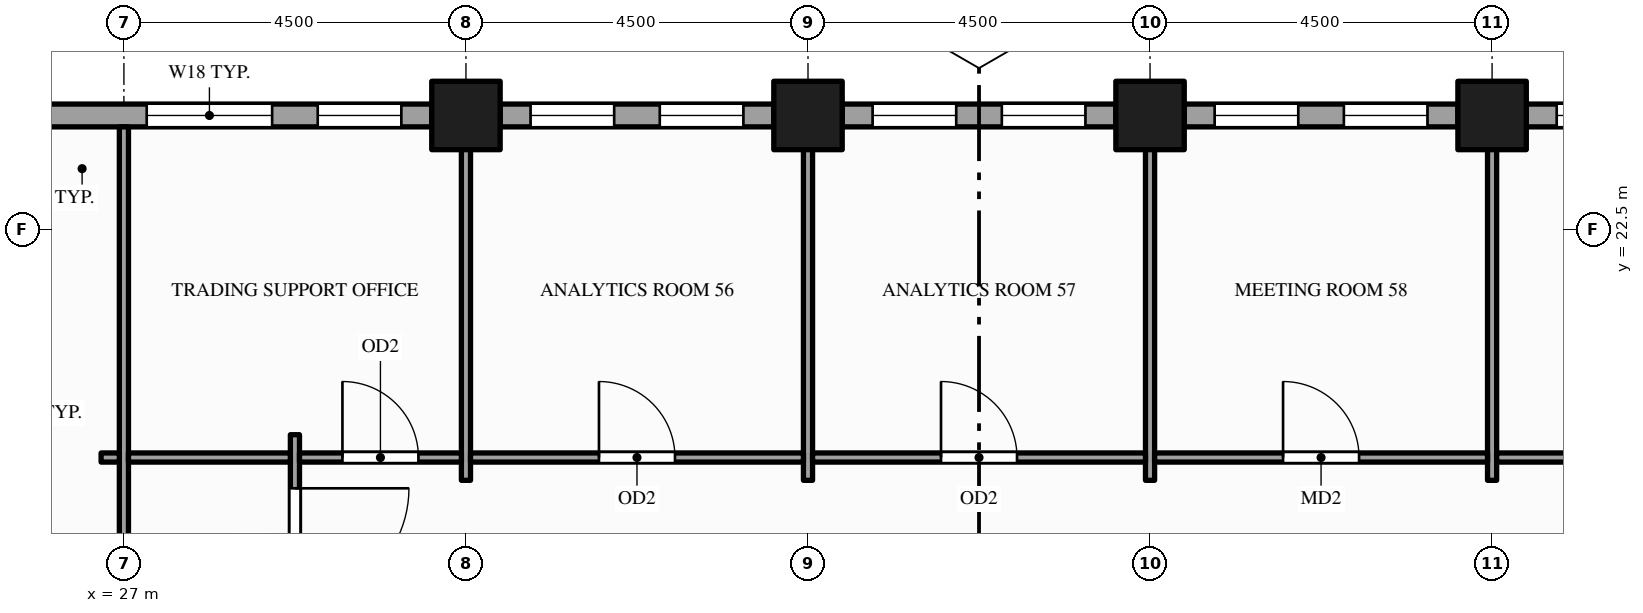
"""IFC4 building model, lengths in metres.
Left out: names, types, materials, properties, quantities, classifications, styles, units other than length and angle.
Written with IfcOpenShell. Run it as: python <this file> out.ifc"""

import sys

from ifc_helpers import new_model, si_unit, direction, frame, frame_2d, origin, origin_2d, place, context, subcontext, project, spatial, rectangle, hollow_rectangle, extrude, element, fill, save


model = new_model("IFC4")
c1 = context("Model", 3, precision=1e-05, world=origin(), true_north=direction((0.0, 1.0)))
c2 = subcontext(c1, "Body", "Model", "MODEL_VIEW")
j1 = project(units=[si_unit("LENGTHUNIT", "METRE"), si_unit("PLANEANGLEUNIT", "RADIAN")], contexts=[c1])
p1 = place(None, origin())
s1 = spatial("IfcSite", under=j1, at=p1, CompositionType="ELEMENT")
p2 = place(p1, origin())
s2 = spatial("IfcBuilding", under=s1, at=p2, CompositionType="ELEMENT")
p3 = place(p2, frame((0.0, 0.0, 179.0)))
s3 = spatial("IfcBuildingStorey", under=s2, at=p3, CompositionType="ELEMENT", Elevation=179.0)
for number, where, z_axis, x_axis in (
    (1, (31.5, 24.0, -0.15), (0.0, 0.0, 1.0), (1.0, 0.0, 0.0)),
    (2, (36.0, 24.0, -0.15), (0.0, 0.0, 1.0), (1.0, 0.0, 0.0)),
    (3, (40.5, 24.0, -0.15), (0.0, 0.0, 1.0), (1.0, 0.0, 0.0)),
    (4, (45.0, 24.0, -0.15), (0.0, 0.0, 1.0), (1.0, 0.0, 0.0)),
):
    element("IfcColumn", number, at=place(p3, frame(where, z_axis=z_axis, x_axis=x_axis)), inside=s3, PredefinedType="COLUMN", context=c2, shape_type="SweptSolid", body=[
        extrude(hollow_rectangle(XDim=0.9, YDim=0.9, WallThickness=0.045, at=origin_2d()), origin(), (0.0, 0.0, 1.0), 4.0),
    ])
p4 = place(p3, frame((49.05, 24.0, 0.0), z_axis=(0.0, 0.0, 1.0), x_axis=(-1.0, 0.0, 0.0)))
e5 = element("IfcWall", 5, at=p4, inside=s3, PredefinedType="STANDARD", context=c2, shape_type="SweptSolid", body=[
    extrude(rectangle(XDim=3.6, YDim=0.3, at=frame_2d((1.8, 0.0))), origin(), (0.0, 0.0, 1.0), 2.87),
])
p5 = place(p4, frame((0.4, 0.0, 0.9)))
e6 = element("IfcOpeningElement", 6, at=p5, cuts=e5, PredefinedType="OPENING", context=c2, shape_type="SweptSolid", body=[
    extrude(rectangle(XDim=1.1, YDim=1.75, at=frame_2d((0.55, 0.875))), frame((0.0, 0.16, 0.0), z_axis=(0.0, -1.0, 0.0), x_axis=(1.0, 0.0, 0.0)), (0.0, 0.0, 1.0), 0.32),
])
p6 = place(p4, frame((2.1, 0.0, 0.9)))
e7 = element("IfcOpeningElement", 7, at=p6, cuts=e5, PredefinedType="OPENING", context=c2, shape_type="SweptSolid", body=[
    extrude(rectangle(XDim=1.1, YDim=1.75, at=frame_2d((0.55, 0.875))), frame((0.0, 0.16, 0.0), z_axis=(0.0, -1.0, 0.0), x_axis=(1.0, 0.0, 0.0)), (0.0, 0.0, 1.0), 0.32),
])
p7 = place(p3, frame((44.55, 24.0, 0.0), z_axis=(0.0, 0.0, 1.0), x_axis=(-1.0, 0.0, 0.0)))
e8 = element("IfcWall", 8, at=p7, inside=s3, PredefinedType="STANDARD", context=c2, shape_type="SweptSolid", body=[
    extrude(rectangle(XDim=3.6, YDim=0.3, at=frame_2d((1.8, 0.0))), origin(), (0.0, 0.0, 1.0), 2.87),
])
p8 = place(p7, frame((0.4, 0.0, 0.9)))
e9 = element("IfcOpeningElement", 9, at=p8, cuts=e8, PredefinedType="OPENING", context=c2, shape_type="SweptSolid", body=[
    extrude(rectangle(XDim=1.1, YDim=1.75, at=frame_2d((0.55, 0.875))), frame((0.0, 0.16, 0.0), z_axis=(0.0, -1.0, 0.0), x_axis=(1.0, 0.0, 0.0)), (0.0, 0.0, 1.0), 0.32),
])
p9 = place(p7, frame((2.1, 0.0, 0.9)))
e10 = element("IfcOpeningElement", 10, at=p9, cuts=e8, PredefinedType="OPENING", context=c2, shape_type="SweptSolid", body=[
    extrude(rectangle(XDim=1.1, YDim=1.75, at=frame_2d((0.55, 0.875))), frame((0.0, 0.16, 0.0), z_axis=(0.0, -1.0, 0.0), x_axis=(1.0, 0.0, 0.0)), (0.0, 0.0, 1.0), 0.32),
])
p10 = place(p3, frame((40.05, 24.0, 0.0), z_axis=(0.0, 0.0, 1.0), x_axis=(-1.0, 0.0, 0.0)))
e11 = element("IfcWall", 11, at=p10, inside=s3, PredefinedType="STANDARD", context=c2, shape_type="SweptSolid", body=[
    extrude(rectangle(XDim=3.6, YDim=0.3, at=frame_2d((1.8, 0.0))), origin(), (0.0, 0.0, 1.0), 2.87),
])
p11 = place(p10, frame((0.4, 0.0, 0.9)))
e12 = element("IfcOpeningElement", 12, at=p11, cuts=e11, PredefinedType="OPENING", context=c2, shape_type="SweptSolid", body=[
    extrude(rectangle(XDim=1.1, YDim=1.75, at=frame_2d((0.55, 0.875))), frame((0.0, 0.16, 0.0), z_axis=(0.0, -1.0, 0.0), x_axis=(1.0, 0.0, 0.0)), (0.0, 0.0, 1.0), 0.32),
])
p12 = place(p10, frame((2.1, 0.0, 0.9)))
e13 = element("IfcOpeningElement", 13, at=p12, cuts=e11, PredefinedType="OPENING", context=c2, shape_type="SweptSolid", body=[
    extrude(rectangle(XDim=1.1, YDim=1.75, at=frame_2d((0.55, 0.875))), frame((0.0, 0.16, 0.0), z_axis=(0.0, -1.0, 0.0), x_axis=(1.0, 0.0, 0.0)), (0.0, 0.0, 1.0), 0.32),
])
p13 = place(p3, frame((35.55, 24.0, 0.0), z_axis=(0.0, 0.0, 1.0), x_axis=(-1.0, 0.0, 0.0)))
e14 = element("IfcWall", 14, at=p13, inside=s3, PredefinedType="STANDARD", context=c2, shape_type="SweptSolid", body=[
    extrude(rectangle(XDim=3.6, YDim=0.3, at=frame_2d((1.8, 0.0))), origin(), (0.0, 0.0, 1.0), 2.87),
])
p14 = place(p13, frame((0.4, 0.0, 0.9)))
e15 = element("IfcOpeningElement", 15, at=p14, cuts=e14, PredefinedType="OPENING", context=c2, shape_type="SweptSolid", body=[
    extrude(rectangle(XDim=1.1, YDim=1.75, at=frame_2d((0.55, 0.875))), frame((0.0, 0.16, 0.0), z_axis=(0.0, -1.0, 0.0), x_axis=(1.0, 0.0, 0.0)), (0.0, 0.0, 1.0), 0.32),
])
p15 = place(p13, frame((2.1, 0.0, 0.9)))
e16 = element("IfcOpeningElement", 16, at=p15, cuts=e14, PredefinedType="OPENING", context=c2, shape_type="SweptSolid", body=[
    extrude(rectangle(XDim=1.1, YDim=1.75, at=frame_2d((0.55, 0.875))), frame((0.0, 0.16, 0.0), z_axis=(0.0, -1.0, 0.0), x_axis=(1.0, 0.0, 0.0)), (0.0, 0.0, 1.0), 0.32),
])
p16 = place(p3, frame((31.05, 24.0, 0.0), z_axis=(0.0, 0.0, 1.0), x_axis=(-1.0, 0.0, 0.0)))
e17 = element("IfcWall", 17, at=p16, inside=s3, PredefinedType="STANDARD", context=c2, shape_type="SweptSolid", body=[
    extrude(rectangle(XDim=5.1, YDim=0.3, at=frame_2d((2.55, 0.0))), origin(), (0.0, 0.0, 1.0), 2.87),
])
p17 = place(p16, frame((0.4, 0.0, 0.9)))
e18 = element("IfcOpeningElement", 18, at=p17, cuts=e17, PredefinedType="OPENING", context=c2, shape_type="SweptSolid", body=[
    extrude(rectangle(XDim=1.1, YDim=1.75, at=frame_2d((0.55, 0.875))), frame((0.0, 0.16, 0.0), z_axis=(0.0, -1.0, 0.0), x_axis=(1.0, 0.0, 0.0)), (0.0, 0.0, 1.0), 0.32),
])
p18 = place(p16, frame((2.1, 0.0, 0.9)))
e19 = element("IfcOpeningElement", 19, at=p18, cuts=e17, PredefinedType="OPENING", context=c2, shape_type="SweptSolid", body=[
    extrude(rectangle(XDim=1.65, YDim=1.75, at=frame_2d((0.825, 0.875))), frame((0.0, 0.16, 0.0), z_axis=(0.0, -1.0, 0.0), x_axis=(1.0, 0.0, 0.0)), (0.0, 0.0, 1.0), 0.32),
])
p19 = place(p3, frame((27.0, 1.65, 0.0), z_axis=(0.0, 0.0, 1.0), x_axis=(0.0, 1.0, 0.0)))
e20 = element("IfcWall", 20, at=p19, inside=s3, PredefinedType="PARTITIONING", context=c2, shape_type="SweptSolid", body=[
    extrude(rectangle(XDim=22.2, YDim=0.12, at=frame_2d((11.1, 0.0))), origin(), (0.0, 0.0, 1.0), 2.87),
])
p20 = place(p19, frame((7.725, 0.0, 0.0)))
e21 = element("IfcOpeningElement", 21, at=p20, cuts=e20, PredefinedType="OPENING", context=c2, shape_type="SweptSolid", body=[
    extrude(rectangle(XDim=1.5, YDim=2.1, at=frame_2d((0.75, 1.05))), frame((0.0, 0.07, 0.0), z_axis=(0.0, -1.0, 0.0), x_axis=(1.0, 0.0, 0.0)), (0.0, 0.0, 1.0), 0.14),
])
p21 = place(p19, frame((13.125, 0.0, 0.0)))
e22 = element("IfcOpeningElement", 22, at=p21, cuts=e20, PredefinedType="OPENING", context=c2, shape_type="SweptSolid", body=[
    extrude(rectangle(XDim=1.2, YDim=2.1, at=frame_2d((0.6, 1.05))), frame((0.0, 0.07, 0.0), z_axis=(0.0, -1.0, 0.0), x_axis=(1.0, 0.0, 0.0)), (0.0, 0.0, 1.0), 0.14),
])
p22 = place(p3, frame((29.25, 5.7, 0.0), z_axis=(0.0, 0.0, 1.0), x_axis=(0.0, 1.0, 0.0)))
e23 = element("IfcWall", 23, at=p22, inside=s3, PredefinedType="PARTITIONING", context=c2, shape_type="SweptSolid", body=[
    extrude(rectangle(XDim=14.1, YDim=0.12, at=frame_2d((7.05, 0.0))), origin(), (0.0, 0.0, 1.0), 2.87),
])
p23 = place(p22, frame((0.705, 0.0, 0.0)))
e24 = element("IfcOpeningElement", 24, at=p23, cuts=e23, PredefinedType="OPENING", context=c2, shape_type="SweptSolid", body=[
    extrude(rectangle(XDim=1.5, YDim=2.1, at=frame_2d((0.75, 1.05))), frame((0.0, 0.07, 0.0), z_axis=(0.0, -1.0, 0.0), x_axis=(1.0, 0.0, 0.0)), (0.0, 0.0, 1.0), 0.14),
])
p24 = place(p22, frame((11.895, 0.0, 0.0)))
e25 = element("IfcOpeningElement", 25, at=p24, cuts=e23, PredefinedType="OPENING", context=c2, shape_type="SweptSolid", body=[
    extrude(rectangle(XDim=1.5, YDim=2.1, at=frame_2d((0.75, 1.05))), frame((0.0, 0.07, 0.0), z_axis=(0.0, -1.0, 0.0), x_axis=(1.0, 0.0, 0.0)), (0.0, 0.0, 1.0), 0.14),
])
for number, where, z_axis, x_axis in (
    (26, (31.5, 19.2, 0.0), (0.0, 0.0, 1.0), (0.0, 1.0, 0.0)),
    (27, (36.0, 19.2, 0.0), (0.0, 0.0, 1.0), (0.0, 1.0, 0.0)),
    (28, (40.5, 19.2, 0.0), (0.0, 0.0, 1.0), (0.0, 1.0, 0.0)),
    (29, (45.0, 19.2, 0.0), (0.0, 0.0, 1.0), (0.0, 1.0, 0.0)),
):
    element("IfcWall", number, at=place(p3, frame(where, z_axis=z_axis, x_axis=x_axis)), inside=s3, PredefinedType="PARTITIONING", context=c2, shape_type="SweptSolid", body=[
        extrude(rectangle(XDim=4.65, YDim=0.12, at=frame_2d((2.325, 0.0))), origin(), (0.0, 0.0, 1.0), 2.87),
    ])
p25 = place(p3, frame((26.7, 19.5, 0.0), z_axis=(0.0, 0.0, 1.0), x_axis=(1.0, 0.0, 0.0)))
e30 = element("IfcWall", 30, at=p25, inside=s3, PredefinedType="PARTITIONING", context=c2, shape_type="SweptSolid", body=[
    extrude(rectangle(XDim=0.24, YDim=0.12, at=frame_2d((0.12, 0.0))), origin(), (0.0, 0.0, 1.0), 2.87),
])
p26 = place(p3, frame((27.06, 19.5, 0.0), z_axis=(0.0, 0.0, 1.0), x_axis=(1.0, 0.0, 0.0)))
e31 = element("IfcWall", 31, at=p26, inside=s3, PredefinedType="PARTITIONING", context=c2, shape_type="SweptSolid", body=[
    extrude(rectangle(XDim=2.13, YDim=0.12, at=frame_2d((1.065, 0.0))), origin(), (0.0, 0.0, 1.0), 2.87),
])
p27 = place(p3, frame((29.31, 19.5, 0.0), z_axis=(0.0, 0.0, 1.0), x_axis=(1.0, 0.0, 0.0)))
e32 = element("IfcWall", 32, at=p27, inside=s3, PredefinedType="PARTITIONING", context=c2, shape_type="SweptSolid", body=[
    extrude(rectangle(XDim=2.13, YDim=0.12, at=frame_2d((1.065, 0.0))), origin(), (0.0, 0.0, 1.0), 2.87),
])
p28 = place(p27, frame((0.565, 0.0, 0.0)))
e33 = element("IfcOpeningElement", 33, at=p28, cuts=e32, PredefinedType="OPENING", context=c2, shape_type="SweptSolid", body=[
    extrude(rectangle(XDim=1.0, YDim=2.1, at=frame_2d((0.5, 1.05))), frame((0.0, 0.07, 0.0), z_axis=(0.0, -1.0, 0.0), x_axis=(1.0, 0.0, 0.0)), (0.0, 0.0, 1.0), 0.14),
])
p29 = place(p3, frame((31.56, 19.5, 0.0), z_axis=(0.0, 0.0, 1.0), x_axis=(1.0, 0.0, 0.0)))
e34 = element("IfcWall", 34, at=p29, inside=s3, PredefinedType="PARTITIONING", context=c2, shape_type="SweptSolid", body=[
    extrude(rectangle(XDim=4.38, YDim=0.12, at=frame_2d((2.19, 0.0))), origin(), (0.0, 0.0, 1.0), 2.87),
])
p30 = place(p29, frame((1.69, 0.0, 0.0)))
e35 = element("IfcOpeningElement", 35, at=p30, cuts=e34, PredefinedType="OPENING", context=c2, shape_type="SweptSolid", body=[
    extrude(rectangle(XDim=1.0, YDim=2.1, at=frame_2d((0.5, 1.05))), frame((0.0, 0.07, 0.0), z_axis=(0.0, -1.0, 0.0), x_axis=(1.0, 0.0, 0.0)), (0.0, 0.0, 1.0), 0.14),
])
p31 = place(p3, frame((36.06, 19.5, 0.0), z_axis=(0.0, 0.0, 1.0), x_axis=(1.0, 0.0, 0.0)))
e36 = element("IfcWall", 36, at=p31, inside=s3, PredefinedType="PARTITIONING", context=c2, shape_type="SweptSolid", body=[
    extrude(rectangle(XDim=4.38, YDim=0.12, at=frame_2d((2.19, 0.0))), origin(), (0.0, 0.0, 1.0), 2.87),
])
p32 = place(p31, frame((1.69, 0.0, 0.0)))
e37 = element("IfcOpeningElement", 37, at=p32, cuts=e36, PredefinedType="OPENING", context=c2, shape_type="SweptSolid", body=[
    extrude(rectangle(XDim=1.0, YDim=2.1, at=frame_2d((0.5, 1.05))), frame((0.0, 0.07, 0.0), z_axis=(0.0, -1.0, 0.0), x_axis=(1.0, 0.0, 0.0)), (0.0, 0.0, 1.0), 0.14),
])
p33 = place(p3, frame((40.56, 19.5, 0.0), z_axis=(0.0, 0.0, 1.0), x_axis=(1.0, 0.0, 0.0)))
e38 = element("IfcWall", 38, at=p33, inside=s3, PredefinedType="PARTITIONING", context=c2, shape_type="SweptSolid", body=[
    extrude(rectangle(XDim=4.38, YDim=0.12, at=frame_2d((2.19, 0.0))), origin(), (0.0, 0.0, 1.0), 2.87),
])
p34 = place(p33, frame((1.69, 0.0, 0.0)))
e39 = element("IfcOpeningElement", 39, at=p34, cuts=e38, PredefinedType="OPENING", context=c2, shape_type="SweptSolid", body=[
    extrude(rectangle(XDim=1.0, YDim=2.1, at=frame_2d((0.5, 1.05))), frame((0.0, 0.07, 0.0), z_axis=(0.0, -1.0, 0.0), x_axis=(1.0, 0.0, 0.0)), (0.0, 0.0, 1.0), 0.14),
])
p35 = place(p3, frame((45.06, 19.5, 0.0), z_axis=(0.0, 0.0, 1.0), x_axis=(1.0, 0.0, 0.0)))
e40 = element("IfcWall", 40, at=p35, inside=s3, PredefinedType="PARTITIONING", context=c2, shape_type="SweptSolid", body=[
    extrude(rectangle(XDim=4.38, YDim=0.12, at=frame_2d((2.19, 0.0))), origin(), (0.0, 0.0, 1.0), 2.87),
])
p36 = place(p35, frame((1.69, 0.0, 0.0)))
e41 = element("IfcOpeningElement", 41, at=p36, cuts=e40, PredefinedType="OPENING", context=c2, shape_type="SweptSolid", body=[
    extrude(rectangle(XDim=1.0, YDim=2.1, at=frame_2d((0.5, 1.05))), frame((0.0, 0.07, 0.0), z_axis=(0.0, -1.0, 0.0), x_axis=(1.0, 0.0, 0.0)), (0.0, 0.0, 1.0), 0.14),
])
p37 = place(p6, origin())
e42 = element("IfcWindow", 42, at=p37, inside=s3, PartitioningType="SINGLE_PANEL", PredefinedType="WINDOW", context=c2, shape_type="SweptSolid", body=[
    extrude(rectangle(XDim=1.1, YDim=1.75, at=frame_2d((0.55, 0.875))), frame((0.0, 0.03, 0.0), z_axis=(0.0, -1.0, 0.0), x_axis=(1.0, 0.0, 0.0)), (0.0, 0.0, 1.0), 0.06),
])
fill(e7, e42)
p38 = place(p8, origin())
e43 = element("IfcWindow", 43, at=p38, inside=s3, PartitioningType="SINGLE_PANEL", PredefinedType="WINDOW", context=c2, shape_type="SweptSolid", body=[
    extrude(rectangle(XDim=1.1, YDim=1.75, at=frame_2d((0.55, 0.875))), frame((0.0, 0.03, 0.0), z_axis=(0.0, -1.0, 0.0), x_axis=(1.0, 0.0, 0.0)), (0.0, 0.0, 1.0), 0.06),
])
fill(e9, e43)
p39 = place(p9, origin())
e44 = element("IfcWindow", 44, at=p39, inside=s3, PartitioningType="SINGLE_PANEL", PredefinedType="WINDOW", context=c2, shape_type="SweptSolid", body=[
    extrude(rectangle(XDim=1.1, YDim=1.75, at=frame_2d((0.55, 0.875))), frame((0.0, 0.03, 0.0), z_axis=(0.0, -1.0, 0.0), x_axis=(1.0, 0.0, 0.0)), (0.0, 0.0, 1.0), 0.06),
])
fill(e10, e44)
p40 = place(p11, origin())
e45 = element("IfcWindow", 45, at=p40, inside=s3, PartitioningType="SINGLE_PANEL", PredefinedType="WINDOW", context=c2, shape_type="SweptSolid", body=[
    extrude(rectangle(XDim=1.1, YDim=1.75, at=frame_2d((0.55, 0.875))), frame((0.0, 0.03, 0.0), z_axis=(0.0, -1.0, 0.0), x_axis=(1.0, 0.0, 0.0)), (0.0, 0.0, 1.0), 0.06),
])
fill(e12, e45)
p41 = place(p12, origin())
e46 = element("IfcWindow", 46, at=p41, inside=s3, PartitioningType="SINGLE_PANEL", PredefinedType="WINDOW", context=c2, shape_type="SweptSolid", body=[
    extrude(rectangle(XDim=1.1, YDim=1.75, at=frame_2d((0.55, 0.875))), frame((0.0, 0.03, 0.0), z_axis=(0.0, -1.0, 0.0), x_axis=(1.0, 0.0, 0.0)), (0.0, 0.0, 1.0), 0.06),
])
fill(e13, e46)
p42 = place(p14, origin())
e47 = element("IfcWindow", 47, at=p42, inside=s3, PartitioningType="SINGLE_PANEL", PredefinedType="WINDOW", context=c2, shape_type="SweptSolid", body=[
    extrude(rectangle(XDim=1.1, YDim=1.75, at=frame_2d((0.55, 0.875))), frame((0.0, 0.03, 0.0), z_axis=(0.0, -1.0, 0.0), x_axis=(1.0, 0.0, 0.0)), (0.0, 0.0, 1.0), 0.06),
])
fill(e15, e47)
p43 = place(p15, origin())
e48 = element("IfcWindow", 48, at=p43, inside=s3, PartitioningType="SINGLE_PANEL", PredefinedType="WINDOW", context=c2, shape_type="SweptSolid", body=[
    extrude(rectangle(XDim=1.1, YDim=1.75, at=frame_2d((0.55, 0.875))), frame((0.0, 0.03, 0.0), z_axis=(0.0, -1.0, 0.0), x_axis=(1.0, 0.0, 0.0)), (0.0, 0.0, 1.0), 0.06),
])
fill(e16, e48)
p44 = place(p17, origin())
e49 = element("IfcWindow", 49, at=p44, inside=s3, PartitioningType="SINGLE_PANEL", PredefinedType="WINDOW", context=c2, shape_type="SweptSolid", body=[
    extrude(rectangle(XDim=1.1, YDim=1.75, at=frame_2d((0.55, 0.875))), frame((0.0, 0.03, 0.0), z_axis=(0.0, -1.0, 0.0), x_axis=(1.0, 0.0, 0.0)), (0.0, 0.0, 1.0), 0.06),
])
fill(e18, e49)
p45 = place(p18, origin())
e50 = element("IfcWindow", 50, at=p45, inside=s3, PartitioningType="SINGLE_PANEL", PredefinedType="WINDOW", context=c2, shape_type="SweptSolid", body=[
    extrude(rectangle(XDim=1.65, YDim=1.75, at=frame_2d((0.825, 0.875))), frame((0.0, 0.03, 0.0), z_axis=(0.0, -1.0, 0.0), x_axis=(1.0, 0.0, 0.0)), (0.0, 0.0, 1.0), 0.06),
])
fill(e19, e50)
p46 = place(p24, origin())
e51 = element("IfcDoor", 51, at=p46, inside=s3, OperationType="SINGLE_SWING_RIGHT", PredefinedType="DOOR", context=c2, shape_type="SweptSolid", body=[
    extrude(rectangle(XDim=1.5, YDim=2.1, at=frame_2d((0.75, 1.05))), frame((0.0, 0.025, 0.0), z_axis=(0.0, -1.0, 0.0), x_axis=(1.0, 0.0, 0.0)), (0.0, 0.0, 1.0), 0.05),
])
fill(e25, e51)
p47 = place(p28, origin())
e52 = element("IfcDoor", 52, at=p47, inside=s3, OperationType="SINGLE_SWING_LEFT", PredefinedType="DOOR", context=c2, shape_type="SweptSolid", body=[
    extrude(rectangle(XDim=1.0, YDim=2.1, at=frame_2d((0.5, 1.05))), frame((0.0, 0.025, 0.0), z_axis=(0.0, -1.0, 0.0), x_axis=(1.0, 0.0, 0.0)), (0.0, 0.0, 1.0), 0.05),
])
fill(e33, e52)
p48 = place(p30, origin())
e53 = element("IfcDoor", 53, at=p48, inside=s3, OperationType="SINGLE_SWING_LEFT", PredefinedType="DOOR", context=c2, shape_type="SweptSolid", body=[
    extrude(rectangle(XDim=1.0, YDim=2.1, at=frame_2d((0.5, 1.05))), frame((0.0, 0.025, 0.0), z_axis=(0.0, -1.0, 0.0), x_axis=(1.0, 0.0, 0.0)), (0.0, 0.0, 1.0), 0.05),
])
fill(e35, e53)
p49 = place(p32, origin())
e54 = element("IfcDoor", 54, at=p49, inside=s3, OperationType="SINGLE_SWING_LEFT", PredefinedType="DOOR", context=c2, shape_type="SweptSolid", body=[
    extrude(rectangle(XDim=1.0, YDim=2.1, at=frame_2d((0.5, 1.05))), frame((0.0, 0.025, 0.0), z_axis=(0.0, -1.0, 0.0), x_axis=(1.0, 0.0, 0.0)), (0.0, 0.0, 1.0), 0.05),
])
fill(e37, e54)
p50 = place(p34, origin())
e55 = element("IfcDoor", 55, at=p50, inside=s3, OperationType="SINGLE_SWING_LEFT", PredefinedType="DOOR", context=c2, shape_type="SweptSolid", body=[
    extrude(rectangle(XDim=1.0, YDim=2.1, at=frame_2d((0.5, 1.05))), frame((0.0, 0.025, 0.0), z_axis=(0.0, -1.0, 0.0), x_axis=(1.0, 0.0, 0.0)), (0.0, 0.0, 1.0), 0.05),
])
fill(e39, e55)
save(model, sys.argv[1])
